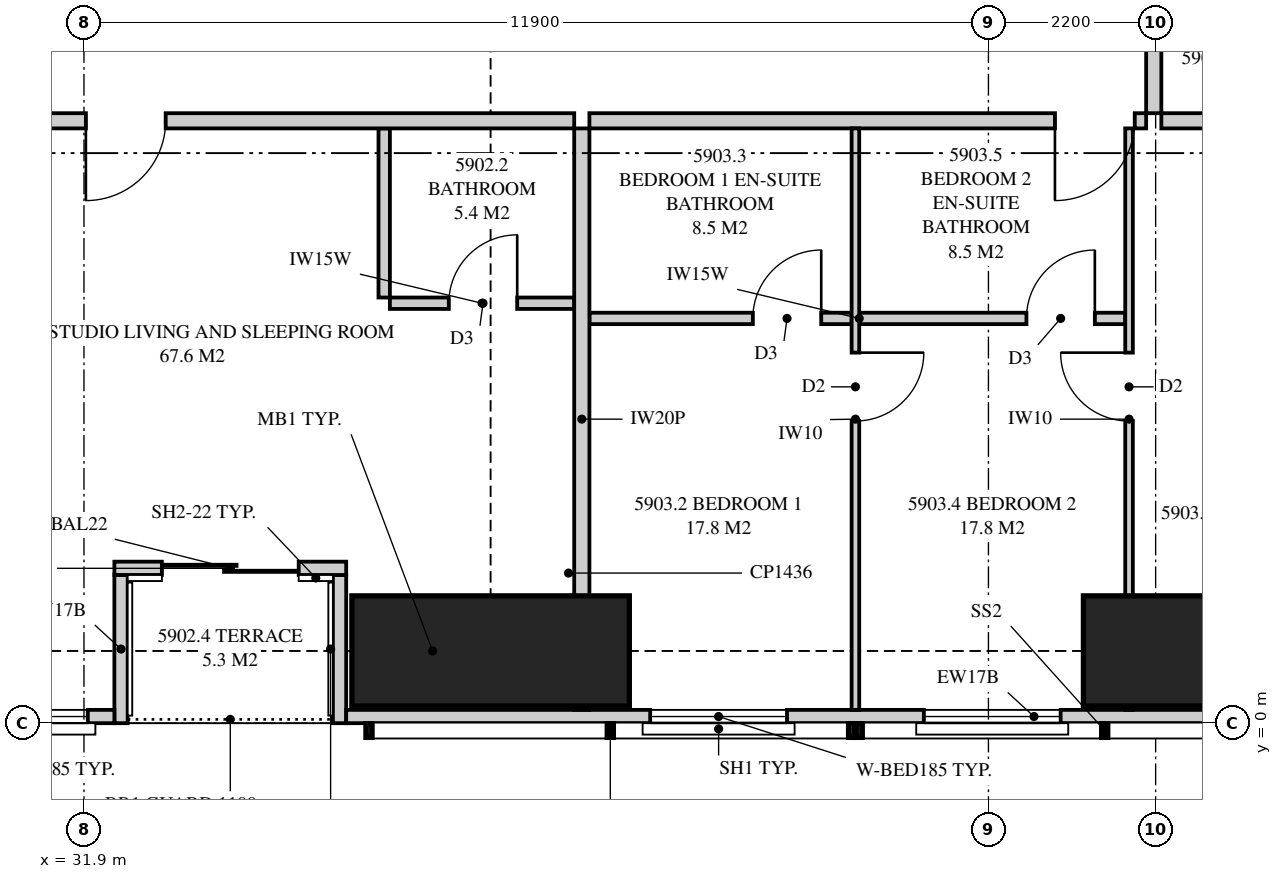
"""IFC4 building model, lengths in metres.
Left out: names, types, materials, properties, quantities, classifications, styles, units other than length and angle.
Written with IfcOpenShell. Run it as: python <this file> out.ifc"""

import sys

from ifc_helpers import new_model, si_unit, direction, frame, frame_2d, origin, origin_2d, place, context, subcontext, project, spatial, polyline, rectangle, outline, extrude, element, fill, save


model = new_model("IFC4")
c1 = context("Model", 3, precision=1e-05, world=origin(), true_north=direction((0.0, 1.0)))
c2 = subcontext(c1, "Body", "Model", "MODEL_VIEW")
j1 = project(units=[si_unit("LENGTHUNIT", "METRE"), si_unit("PLANEANGLEUNIT", "RADIAN")], contexts=[c1])
p1 = place(None, origin())
s1 = spatial("IfcSite", under=j1, at=p1, CompositionType="ELEMENT")
p2 = place(p1, origin())
s2 = spatial("IfcBuilding", under=s1, at=p2, CompositionType="ELEMENT")
p3 = place(p2, frame((0.0, 0.0, 217.95)))
s3 = spatial("IfcBuildingStorey", under=s2, at=p3, CompositionType="ELEMENT", Elevation=217.95)
for number, where, z_axis, x_axis in (
    (1, (37.25, 0.95, 0.0), (0.0, 0.0, 1.0), (0.0, 1.0, 0.0)),
    (2, (46.875, 0.95, 0.0), (0.0, 0.0, 1.0), (0.0, 1.0, 0.0)),
):
    element("IfcColumn", number, at=place(p3, frame(where, z_axis=z_axis, x_axis=x_axis)), inside=s3, PredefinedType="COLUMN", context=c2, shape_type="SweptSolid", body=[
        extrude(rectangle(XDim=1.45, YDim=3.65, at=origin_2d()), origin(), (0.0, 0.0, 1.0), 3.5),
    ])
p4 = place(p3, frame((19.851, 0.087, 0.0), z_axis=(0.0, 0.0, 1.0), x_axis=(1.0, 0.0, 0.0)))
e3 = element("IfcWall", 3, at=p4, inside=s3, PredefinedType="SOLIDWALL", context=c2, shape_type="SweptSolid", body=[
    extrude(outline(polyline([(0.0, 0.0), (12.449, 0.0), (12.449, 2.3), (7.774, 2.3), (7.774, 3.26), (7.642, 3.26), (7.642, 2.3), (7.559, 2.3), (7.559, 3.26), (0.0, 3.26), (0.0, 0.0)])), frame((0.0, 0.087, 0.0), z_axis=(0.0, -1.0, 0.0), x_axis=(1.0, 0.0, 0.0)), (0.0, 0.0, 1.0), 0.175),
])
p5 = place(p4, frame((0.5, 0.0, 0.4)))
e4 = element("IfcOpeningElement", 4, at=p5, cuts=e3, PredefinedType="OPENING", context=c2, shape_type="SweptSolid", body=[
    extrude(rectangle(XDim=2.4, YDim=1.85, at=frame_2d((1.2, 0.925))), frame((0.0, 0.097, 0.0), z_axis=(0.0, -1.0, 0.0), x_axis=(1.0, 0.0, 0.0)), (0.0, 0.0, 1.0), 0.195),
])
p6 = place(p4, frame((4.04, 0.0, 0.4)))
e5 = element("IfcOpeningElement", 5, at=p6, cuts=e3, PredefinedType="OPENING", context=c2, shape_type="SweptSolid", body=[
    extrude(rectangle(XDim=1.8, YDim=1.85, at=frame_2d((0.9, 0.925))), frame((0.0, 0.097, 0.0), z_axis=(0.0, -1.0, 0.0), x_axis=(1.0, 0.0, 0.0)), (0.0, 0.0, 1.0), 0.195),
])
p7 = place(p4, frame((9.699, 0.0, 0.4)))
e6 = element("IfcOpeningElement", 6, at=p7, cuts=e3, PredefinedType="OPENING", context=c2, shape_type="SweptSolid", body=[
    extrude(rectangle(XDim=2.4, YDim=1.85, at=frame_2d((1.2, 0.925))), frame((0.0, 0.097, 0.0), z_axis=(0.0, -1.0, 0.0), x_axis=(1.0, 0.0, 0.0)), (0.0, 0.0, 1.0), 0.195),
])
p8 = place(p3, frame((35.35, 0.087, 0.0), z_axis=(0.0, 0.0, 1.0), x_axis=(1.0, 0.0, 0.0)))
e7 = element("IfcWall", 7, at=p8, inside=s3, PredefinedType="SOLIDWALL", context=c2, shape_type="SweptSolid", body=[
    extrude(outline(polyline([(0.0, 0.0), (18.099, 0.0), (18.099, 3.26), (11.74, 3.26), (11.74, 2.3), (11.656, 2.3), (11.656, 3.26), (11.525, 3.26), (11.525, 2.3), (0.0, 2.3), (0.0, 0.0)])), frame((0.0, 0.087, 0.0), z_axis=(0.0, -1.0, 0.0), x_axis=(1.0, 0.0, 0.0)), (0.0, 0.0, 1.0), 0.175),
])
p9 = place(p8, frame((4.0, 0.0, 0.4)))
e8 = element("IfcOpeningElement", 8, at=p9, cuts=e7, PredefinedType="OPENING", context=c2, shape_type="SweptSolid", body=[
    extrude(rectangle(XDim=1.8, YDim=1.85, at=frame_2d((0.9, 0.925))), frame((0.0, 0.097, 0.0), z_axis=(0.0, -1.0, 0.0), x_axis=(1.0, 0.0, 0.0)), (0.0, 0.0, 1.0), 0.195),
])
p10 = place(p8, frame((7.6, 0.0, 0.4)))
e9 = element("IfcOpeningElement", 9, at=p10, cuts=e7, PredefinedType="OPENING", context=c2, shape_type="SweptSolid", body=[
    extrude(rectangle(XDim=1.8, YDim=1.85, at=frame_2d((0.9, 0.925))), frame((0.0, 0.097, 0.0), z_axis=(0.0, -1.0, 0.0), x_axis=(1.0, 0.0, 0.0)), (0.0, 0.0, 1.0), 0.195),
])
p11 = place(p8, frame((13.51, 0.0, 0.4)))
e10 = element("IfcOpeningElement", 10, at=p11, cuts=e7, PredefinedType="OPENING", context=c2, shape_type="SweptSolid", body=[
    extrude(rectangle(XDim=2.4, YDim=1.85, at=frame_2d((1.2, 0.925))), frame((0.0, 0.097, 0.0), z_axis=(0.0, -1.0, 0.0), x_axis=(1.0, 0.0, 0.0)), (0.0, 0.0, 1.0), 0.195),
])
p12 = place(p3, frame((32.3, 2.038, 0.0), z_axis=(0.0, 0.0, 1.0), x_axis=(1.0, 0.0, 0.0)))
e11 = element("IfcWall", 11, at=p12, inside=s3, PredefinedType="SOLIDWALL", context=c2, shape_type="SweptSolid", body=[
    extrude(rectangle(XDim=3.05, YDim=0.175, at=frame_2d((1.525, 0.0))), origin(), (0.0, 0.0, 1.0), 3.26),
])
p13 = place(p12, frame((0.625, 0.0, 0.0)))
e12 = element("IfcOpeningElement", 12, at=p13, cuts=e11, PredefinedType="OPENING", context=c2, shape_type="SweptSolid", body=[
    extrude(rectangle(XDim=1.8, YDim=2.25, at=frame_2d((0.9, 1.125))), frame((0.0, 0.097, 0.0), z_axis=(0.0, -1.0, 0.0), x_axis=(1.0, 0.0, 0.0)), (0.0, 0.0, 1.0), 0.195),
])
for number, where, z_axis, x_axis in (
    (13, (32.387, 0.0, 0.0), (0.0, 0.0, 1.0), (0.0, 1.0, 0.0)),
    (14, (35.262, 0.0, 0.0), (0.0, 0.0, 1.0), (0.0, 1.0, 0.0)),
):
    element("IfcWall", number, at=place(p3, frame(where, z_axis=z_axis, x_axis=x_axis)), inside=s3, PredefinedType="SOLIDWALL", context=c2, shape_type="SweptSolid", body=[
        extrude(outline(polyline([(0.0, 0.0), (1.95, 0.0), (1.95, 3.26), (1.75, 3.26), (1.75, 2.3), (0.15, 2.3), (0.15, 3.26), (0.0, 3.26), (0.0, 0.0)])), frame((0.0, 0.087, 0.0), z_axis=(0.0, -1.0, 0.0), x_axis=(1.0, 0.0, 0.0)), (0.0, 0.0, 1.0), 0.175),
    ])
p14 = place(p3, frame((38.45, 0.175, 0.0), z_axis=(0.0, 0.0, 1.0), x_axis=(0.0, 1.0, 0.0)))
e15 = element("IfcWall", 15, at=p14, inside=s3, PredefinedType="PARTITIONING", context=c2, shape_type="SweptSolid", body=[
    extrude(outline(polyline([(0.529, 2.3), (0.0, 2.3), (0.0, 0.0), (0.529, 0.0), (0.529, 0.22), (1.021, 0.22), (1.021, 0.0), (7.65, 0.0), (7.65, 2.66), (1.685, 2.66), (1.685, 2.3), (1.021, 2.3), (1.021, 1.93), (0.529, 1.93), (0.529, 2.3)])), frame((0.0, 0.1, 0.0), z_axis=(0.0, -1.0, 0.0), x_axis=(1.0, 0.0, 0.0)), (0.0, 0.0, 1.0), 0.2),
])
p15 = place(p3, frame((26.5, 7.925, 0.0), z_axis=(0.0, 0.0, 1.0), x_axis=(1.0, 0.0, 0.0)))
e16 = element("IfcWall", 16, at=p15, inside=s3, PredefinedType="PARTITIONING", context=c2, shape_type="SweptSolid", body=[
    extrude(outline(polyline([(0.0, 0.0), (11.85, 0.0), (11.85, 3.26), (11.85, 2.66), (9.44, 2.66), (9.44, 3.26), (2.435, 3.26), (2.435, 2.66), (0.0, 2.66), (0.0, 3.26), (0.0, 0.0)])), frame((0.0, 0.1, 0.0), z_axis=(0.0, -1.0, 0.0), x_axis=(1.0, 0.0, 0.0)), (0.0, 0.0, 1.0), 0.2),
])
p16 = place(p15, frame((5.425, 0.0, 0.0)))
e17 = element("IfcOpeningElement", 17, at=p16, cuts=e16, PredefinedType="OPENING", context=c2, shape_type="SweptSolid", body=[
    extrude(rectangle(XDim=1.05, YDim=2.2, at=frame_2d((0.525, 1.1))), frame((0.0, 0.11, 0.0), z_axis=(0.0, -1.0, 0.0), x_axis=(1.0, 0.0, 0.0)), (0.0, 0.0, 1.0), 0.22),
])
p17 = place(p3, frame((35.925, 5.525, 0.0), z_axis=(0.0, 0.0, 1.0), x_axis=(1.0, 0.0, 0.0)))
e18 = element("IfcWall", 18, at=p17, inside=s3, PredefinedType="PLUMBINGWALL", context=c2, shape_type="SweptSolid", body=[
    extrude(outline(polyline([(0.0, 0.0), (2.425, 0.0), (2.425, 3.26), (2.425, 2.66), (0.04, 2.66), (0.04, 3.26), (0.0, 3.26), (0.0, 0.0)])), frame((0.0, 0.075, 0.0), z_axis=(0.0, -1.0, 0.0), x_axis=(1.0, 0.0, 0.0)), (0.0, 0.0, 1.0), 0.15),
])
p18 = place(p17, frame((0.775, 0.0, 0.0)))
e19 = element("IfcOpeningElement", 19, at=p18, cuts=e18, PredefinedType="OPENING", context=c2, shape_type="SweptSolid", body=[
    extrude(rectangle(XDim=0.9, YDim=2.1, at=frame_2d((0.45, 1.05))), frame((0.0, 0.085, 0.0), z_axis=(0.0, -1.0, 0.0), x_axis=(1.0, 0.0, 0.0)), (0.0, 0.0, 1.0), 0.17),
])
p19 = place(p3, frame((35.85, 5.6, 0.0), z_axis=(0.0, 0.0, 1.0), x_axis=(0.0, 1.0, 0.0)))
e20 = element("IfcWall", 20, at=p19, inside=s3, PredefinedType="PLUMBINGWALL", context=c2, shape_type="SweptSolid", body=[
    extrude(rectangle(XDim=2.225, YDim=0.15, at=frame_2d((1.112, 0.0))), origin(), (0.0, 0.0, 1.0), 3.26),
])
p20 = place(p3, frame((38.55, 7.925, 0.0), z_axis=(0.0, 0.0, 1.0), x_axis=(1.0, 0.0, 0.0)))
e21 = element("IfcWall", 21, at=p20, inside=s3, PredefinedType="PARTITIONING", context=c2, shape_type="SweptSolid", body=[
    extrude(outline(polyline([(0.0, 0.0), (7.325, 0.0), (7.325, 3.26), (7.325, 2.66), (7.015, 2.66), (7.015, 3.26), (0.01, 3.26), (0.01, 2.66), (0.0, 2.66), (0.0, 3.26), (0.0, 0.0)])), frame((0.0, 0.1, 0.0), z_axis=(0.0, -1.0, 0.0), x_axis=(1.0, 0.0, 0.0)), (0.0, 0.0, 1.0), 0.2),
])
p21 = place(p20, frame((6.125, 0.0, 0.0)))
e22 = element("IfcOpeningElement", 22, at=p21, cuts=e21, PredefinedType="OPENING", context=c2, shape_type="SweptSolid", body=[
    extrude(rectangle(XDim=1.05, YDim=2.2, at=frame_2d((0.525, 1.1))), frame((0.0, 0.11, 0.0), z_axis=(0.0, -1.0, 0.0), x_axis=(1.0, 0.0, 0.0)), (0.0, 0.0, 1.0), 0.22),
])
p22 = place(p3, frame((42.05, 0.175, 0.0), z_axis=(0.0, 0.0, 1.0), x_axis=(0.0, 1.0, 0.0)))
e23 = element("IfcWall", 23, at=p22, inside=s3, PredefinedType="PARTITIONING", context=c2, shape_type="SweptSolid", body=[
    extrude(outline(polyline([(0.0, 0.0), (7.65, 0.0), (7.65, 3.26), (1.635, 3.26), (1.635, 2.3), (0.0, 2.3), (0.0, 3.26), (0.0, 0.0)])), frame((0.0, 0.05, 0.0), z_axis=(0.0, -1.0, 0.0), x_axis=(1.0, 0.0, 0.0)), (0.0, 0.0, 1.0), 0.1),
])
p23 = place(p22, frame((3.8, 0.0, 0.0)))
e24 = element("IfcOpeningElement", 24, at=p23, cuts=e23, PredefinedType="OPENING", context=c2, shape_type="SweptSolid", body=[
    extrude(rectangle(XDim=0.9, YDim=2.1, at=frame_2d((0.45, 1.05))), frame((0.0, 0.06, 0.0), z_axis=(0.0, -1.0, 0.0), x_axis=(1.0, 0.0, 0.0)), (0.0, 0.0, 1.0), 0.12),
])
p24 = place(p3, frame((45.65, 0.175, 0.0), z_axis=(0.0, 0.0, 1.0), x_axis=(0.0, 1.0, 0.0)))
e25 = element("IfcWall", 25, at=p24, inside=s3, PredefinedType="PARTITIONING", context=c2, shape_type="SweptSolid", body=[
    extrude(outline(polyline([(0.529, 2.3), (0.0, 2.3), (0.0, 0.0), (0.529, 0.0), (0.529, 0.13), (1.021, 0.13), (1.021, 0.0), (7.65, 0.0), (7.65, 2.66), (1.635, 2.66), (1.635, 2.3), (1.021, 2.3), (1.021, 2.02), (0.529, 2.02), (0.529, 2.3)])), frame((0.0, 0.05, 0.0), z_axis=(0.0, -1.0, 0.0), x_axis=(1.0, 0.0, 0.0)), (0.0, 0.0, 1.0), 0.1),
])
p25 = place(p24, frame((3.8, 0.0, 0.0)))
e26 = element("IfcOpeningElement", 26, at=p25, cuts=e25, PredefinedType="OPENING", context=c2, shape_type="SweptSolid", body=[
    extrude(rectangle(XDim=0.9, YDim=2.1, at=frame_2d((0.45, 1.05))), frame((0.0, 0.06, 0.0), z_axis=(0.0, -1.0, 0.0), x_axis=(1.0, 0.0, 0.0)), (0.0, 0.0, 1.0), 0.12),
])
p26 = place(p3, frame((38.55, 5.325, 0.0), z_axis=(0.0, 0.0, 1.0), x_axis=(1.0, 0.0, 0.0)))
e27 = element("IfcWall", 27, at=p26, inside=s3, PredefinedType="PLUMBINGWALL", context=c2, shape_type="SweptSolid", body=[
    extrude(rectangle(XDim=3.45, YDim=0.15, at=frame_2d((1.725, 0.0))), origin(), (0.0, 0.0, 1.0), 3.26),
])
p27 = place(p26, frame((2.15, 0.0, 0.0)))
e28 = element("IfcOpeningElement", 28, at=p27, cuts=e27, PredefinedType="OPENING", context=c2, shape_type="SweptSolid", body=[
    extrude(rectangle(XDim=0.9, YDim=2.1, at=frame_2d((0.45, 1.05))), frame((0.0, 0.085, 0.0), z_axis=(0.0, -1.0, 0.0), x_axis=(1.0, 0.0, 0.0)), (0.0, 0.0, 1.0), 0.17),
])
p28 = place(p3, frame((42.1, 5.325, 0.0), z_axis=(0.0, 0.0, 1.0), x_axis=(1.0, 0.0, 0.0)))
e29 = element("IfcWall", 29, at=p28, inside=s3, PredefinedType="PLUMBINGWALL", context=c2, shape_type="SweptSolid", body=[
    extrude(outline(polyline([(0.0, 0.0), (3.5, 0.0), (3.5, 3.26), (3.5, 2.66), (3.49, 2.66), (3.49, 3.26), (0.0, 3.26), (0.0, 0.0)])), frame((0.0, 0.075, 0.0), z_axis=(0.0, -1.0, 0.0), x_axis=(1.0, 0.0, 0.0)), (0.0, 0.0, 1.0), 0.15),
])
p29 = place(p28, frame((2.2, 0.0, 0.0)))
e30 = element("IfcOpeningElement", 30, at=p29, cuts=e29, PredefinedType="OPENING", context=c2, shape_type="SweptSolid", body=[
    extrude(rectangle(XDim=0.9, YDim=2.1, at=frame_2d((0.45, 1.05))), frame((0.0, 0.085, 0.0), z_axis=(0.0, -1.0, 0.0), x_axis=(1.0, 0.0, 0.0)), (0.0, 0.0, 1.0), 0.17),
])
p30 = place(p3, frame((46.075, 7.925, 0.0), z_axis=(0.0, 0.0, 1.0), x_axis=(1.0, 0.0, 0.0)))
e31 = element("IfcWall", 31, at=p30, inside=s3, PredefinedType="PARTITIONING", context=c2, shape_type="SweptSolid", body=[
    extrude(outline(polyline([(0.0, 0.0), (10.425, 0.0), (10.425, 3.26), (9.8, 3.26), (9.8, 2.3), (7.968, 2.3), (7.968, 3.26), (2.11, 3.26), (2.11, 2.66), (0.0, 2.66), (0.0, 3.26), (0.0, 0.0)])), frame((0.0, 0.1, 0.0), z_axis=(0.0, -1.0, 0.0), x_axis=(1.0, 0.0, 0.0)), (0.0, 0.0, 1.0), 0.2),
])
p31 = place(p3, frame((45.975, 8.025, 0.0), z_axis=(0.0, 0.0, 1.0), x_axis=(0.0, 1.0, 0.0)))
e32 = element("IfcWall", 32, at=p31, inside=s3, PredefinedType="PARTITIONING", context=c2, shape_type="SweptSolid", body=[
    extrude(outline(polyline([(0.0, 0.0), (6.025, 0.0), (6.025, 3.26), (6.025, 2.66), (5.085, 2.66), (0.0, 2.66), (0.0, 3.26), (0.0, 0.0)])), frame((0.0, 0.1, 0.0), z_axis=(0.0, -1.0, 0.0), x_axis=(1.0, 0.0, 0.0)), (0.0, 0.0, 1.0), 0.2),
])
p32 = place(p31, frame((2.512, 0.0, 0.0)))
e33 = element("IfcOpeningElement", 33, at=p32, cuts=e32, PredefinedType="OPENING", context=c2, shape_type="SweptSolid", body=[
    extrude(rectangle(XDim=1.05, YDim=2.2, at=frame_2d((0.525, 1.1))), frame((0.0, 0.11, 0.0), z_axis=(0.0, -1.0, 0.0), x_axis=(1.0, 0.0, 0.0)), (0.0, 0.0, 1.0), 0.22),
])
p33 = place(p13, origin())
e34 = element("IfcDoor", 34, at=p33, inside=s3, OperationType="SLIDING_TO_LEFT", PredefinedType="DOOR", context=c2, shape_type="SweptSolid", body=[
    extrude(rectangle(XDim=1.8, YDim=2.25, at=frame_2d((0.9, 1.125))), frame((0.0, 0.025, 0.0), z_axis=(0.0, -1.0, 0.0), x_axis=(1.0, 0.0, 0.0)), (0.0, 0.0, 1.0), 0.05),
])
fill(e12, e34)
p34 = place(p7, origin())
e35 = element("IfcWindow", 35, at=p34, inside=s3, PartitioningType="SINGLE_PANEL", PredefinedType="WINDOW", context=c2, shape_type="SweptSolid", body=[
    extrude(rectangle(XDim=2.4, YDim=1.85, at=frame_2d((1.2, 0.925))), frame((0.0, 0.03, 0.0), z_axis=(0.0, -1.0, 0.0), x_axis=(1.0, 0.0, 0.0)), (0.0, 0.0, 1.0), 0.06),
])
fill(e6, e35)
p35 = place(p9, origin())
e36 = element("IfcWindow", 36, at=p35, inside=s3, PartitioningType="SINGLE_PANEL", PredefinedType="WINDOW", context=c2, shape_type="SweptSolid", body=[
    extrude(rectangle(XDim=1.8, YDim=1.85, at=frame_2d((0.9, 0.925))), frame((0.0, 0.03, 0.0), z_axis=(0.0, -1.0, 0.0), x_axis=(1.0, 0.0, 0.0)), (0.0, 0.0, 1.0), 0.06),
])
fill(e8, e36)
p36 = place(p10, origin())
e37 = element("IfcWindow", 37, at=p36, inside=s3, PartitioningType="SINGLE_PANEL", PredefinedType="WINDOW", context=c2, shape_type="SweptSolid", body=[
    extrude(rectangle(XDim=1.8, YDim=1.85, at=frame_2d((0.9, 0.925))), frame((0.0, 0.03, 0.0), z_axis=(0.0, -1.0, 0.0), x_axis=(1.0, 0.0, 0.0)), (0.0, 0.0, 1.0), 0.06),
])
fill(e9, e37)
p37 = place(p16, frame((1.05, 0.0, 0.0), z_axis=(0.0, 0.0, 1.0), x_axis=(-1.0, 0.0, 0.0)))
e38 = element("IfcDoor", 38, at=p37, inside=s3, OperationType="SINGLE_SWING_RIGHT", PredefinedType="DOOR", context=c2, shape_type="SweptSolid", body=[
    extrude(rectangle(XDim=1.05, YDim=2.2, at=frame_2d((0.525, 1.1))), frame((0.0, 0.025, 0.0), z_axis=(0.0, -1.0, 0.0), x_axis=(1.0, 0.0, 0.0)), (0.0, 0.0, 1.0), 0.05),
])
fill(e17, e38)
p38 = place(p18, origin())
e39 = element("IfcDoor", 39, at=p38, inside=s3, OperationType="SINGLE_SWING_RIGHT", PredefinedType="DOOR", context=c2, shape_type="SweptSolid", body=[
    extrude(rectangle(XDim=0.9, YDim=2.1, at=frame_2d((0.45, 1.05))), frame((0.0, 0.025, 0.0), z_axis=(0.0, -1.0, 0.0), x_axis=(1.0, 0.0, 0.0)), (0.0, 0.0, 1.0), 0.05),
])
fill(e19, e39)
p39 = place(p21, frame((1.05, 0.0, 0.0), z_axis=(0.0, 0.0, 1.0), x_axis=(-1.0, 0.0, 0.0)))
e40 = element("IfcDoor", 40, at=p39, inside=s3, OperationType="SINGLE_SWING_RIGHT", PredefinedType="DOOR", context=c2, shape_type="SweptSolid", body=[
    extrude(rectangle(XDim=1.05, YDim=2.2, at=frame_2d((0.525, 1.1))), frame((0.0, 0.025, 0.0), z_axis=(0.0, -1.0, 0.0), x_axis=(1.0, 0.0, 0.0)), (0.0, 0.0, 1.0), 0.05),
])
fill(e22, e40)
p40 = place(p23, frame((0.9, 0.0, 0.0), z_axis=(0.0, 0.0, 1.0), x_axis=(-1.0, 0.0, 0.0)))
e41 = element("IfcDoor", 41, at=p40, inside=s3, OperationType="SINGLE_SWING_LEFT", PredefinedType="DOOR", context=c2, shape_type="SweptSolid", body=[
    extrude(rectangle(XDim=0.9, YDim=2.1, at=frame_2d((0.45, 1.05))), frame((0.0, 0.025, 0.0), z_axis=(0.0, -1.0, 0.0), x_axis=(1.0, 0.0, 0.0)), (0.0, 0.0, 1.0), 0.05),
])
fill(e24, e41)
p41 = place(p27, origin())
e42 = element("IfcDoor", 42, at=p41, inside=s3, OperationType="SINGLE_SWING_RIGHT", PredefinedType="DOOR", context=c2, shape_type="SweptSolid", body=[
    extrude(rectangle(XDim=0.9, YDim=2.1, at=frame_2d((0.45, 1.05))), frame((0.0, 0.025, 0.0), z_axis=(0.0, -1.0, 0.0), x_axis=(1.0, 0.0, 0.0)), (0.0, 0.0, 1.0), 0.05),
])
fill(e28, e42)
p42 = place(p25, origin())
e43 = element("IfcDoor", 43, at=p42, inside=s3, OperationType="SINGLE_SWING_RIGHT", PredefinedType="DOOR", context=c2, shape_type="SweptSolid", body=[
    extrude(rectangle(XDim=0.9, YDim=2.1, at=frame_2d((0.45, 1.05))), frame((0.0, 0.025, 0.0), z_axis=(0.0, -1.0, 0.0), x_axis=(1.0, 0.0, 0.0)), (0.0, 0.0, 1.0), 0.05),
])
fill(e26, e43)
p43 = place(p29, origin())
e44 = element("IfcDoor", 44, at=p43, inside=s3, OperationType="SINGLE_SWING_RIGHT", PredefinedType="DOOR", context=c2, shape_type="SweptSolid", body=[
    extrude(rectangle(XDim=0.9, YDim=2.1, at=frame_2d((0.45, 1.05))), frame((0.0, 0.025, 0.0), z_axis=(0.0, -1.0, 0.0), x_axis=(1.0, 0.0, 0.0)), (0.0, 0.0, 1.0), 0.05),
])
fill(e30, e44)
save(model, sys.argv[1])
